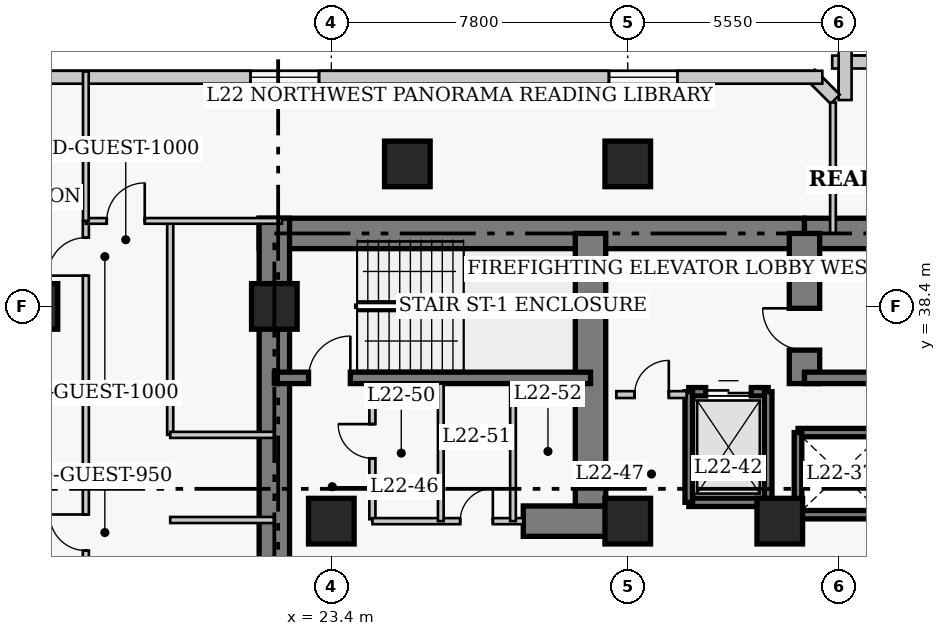
"""IFC4 building model, lengths in metres.
Left out: names, types, materials, properties, quantities, classifications, styles, units other than length and angle.
Written with IfcOpenShell. Run it as: python <this file> out.ifc"""

import sys

from ifc_helpers import new_model, si_unit, direction, frame, frame_2d, origin, origin_2d, place, context, subcontext, project, spatial, rectangle, extrude, element, fill, save


model = new_model("IFC4")
c1 = context("Model", 3, precision=1e-05, world=origin(), true_north=direction((0.0, 1.0)))
c2 = subcontext(c1, "Body", "Model", "MODEL_VIEW")
j1 = project(units=[si_unit("LENGTHUNIT", "METRE"), si_unit("PLANEANGLEUNIT", "RADIAN")], contexts=[c1])
p1 = place(None, origin())
s1 = spatial("IfcSite", under=j1, at=p1, CompositionType="ELEMENT")
p2 = place(p1, origin())
s2 = spatial("IfcBuilding", under=s1, at=p2, CompositionType="ELEMENT")
p3 = place(p2, frame((0.0, 0.0, 91.8)))
s3 = spatial("IfcBuildingStorey", under=s2, at=p3, CompositionType="ELEMENT", Elevation=91.8)
p4 = place(p3, frame((21.5, 40.32, 0.0), z_axis=(0.0, 0.0, 1.0), x_axis=(1.0, 0.0, 0.0)))
e1 = element("IfcWall", 1, at=p4, inside=s3, PredefinedType="SHEAR", context=c2, shape_type="SweptSolid", body=[
    extrude(rectangle(XDim=14.35, YDim=0.8, at=frame_2d((7.175, 0.0))), origin(), (0.0, 0.0, 1.0), 3.8),
])
p5 = place(p3, frame((35.85, 40.32, 0.0), z_axis=(0.0, 0.0, 1.0), x_axis=(1.0, 0.0, 0.0)))
e2 = element("IfcWall", 2, at=p5, inside=s3, PredefinedType="SHEAR", context=c2, shape_type="SweptSolid", body=[
    extrude(rectangle(XDim=12.6, YDim=0.8, at=frame_2d((6.3, 0.0))), origin(), (0.0, 0.0, 1.0), 3.8),
])
p6 = place(p3, frame((21.9, 27.05, 0.0), z_axis=(0.0, 0.0, 1.0), x_axis=(0.0, 1.0, 0.0)))
e3 = element("IfcWall", 3, at=p6, inside=s3, PredefinedType="SHEAR", context=c2, shape_type="SweptSolid", body=[
    extrude(rectangle(XDim=13.67, YDim=0.8, at=frame_2d((6.835, 0.0))), origin(), (0.0, 0.0, 1.0), 3.8),
])
p7 = place(p3, frame((28.45, 32.75, 0.0), z_axis=(0.0, 0.0, 1.0), x_axis=(1.0, 0.0, 0.0)))
e4 = element("IfcWall", 4, at=p7, inside=s3, PredefinedType="SHEAR", context=c2, shape_type="SweptSolid", body=[
    extrude(rectangle(XDim=2.4, YDim=0.8, at=frame_2d((1.2, 0.0))), origin(), (0.0, 0.0, 1.0), 3.8),
])
p8 = place(p3, frame((30.22, 33.15, 0.0), z_axis=(0.0, 0.0, 1.0), x_axis=(0.0, 1.0, 0.0)))
e5 = element("IfcWall", 5, at=p8, inside=s3, PredefinedType="SHEAR", context=c2, shape_type="SweptSolid", body=[
    extrude(rectangle(XDim=7.17, YDim=0.8, at=frame_2d((3.585, 0.0))), origin(), (0.0, 0.0, 1.0), 3.8),
])
p9 = place(p3, frame((35.85, 36.37, 0.0), z_axis=(0.0, 0.0, 1.0), x_axis=(0.0, 1.0, 0.0)))
e6 = element("IfcWall", 6, at=p9, inside=s3, PredefinedType="SHEAR", context=c2, shape_type="SweptSolid", body=[
    extrude(rectangle(XDim=3.95, YDim=0.8, at=frame_2d((1.975, 0.0))), origin(), (0.0, 0.0, 1.0), 3.8),
])
p10 = place(p9, frame((0.88, 0.0, 0.0)))
e7 = element("IfcOpeningElement", 7, at=p10, cuts=e6, PredefinedType="OPENING", context=c2, shape_type="SweptSolid", body=[
    extrude(rectangle(XDim=1.1, YDim=2.15, at=frame_2d((0.55, 1.075))), frame((0.0, 0.41, 0.0), z_axis=(0.0, -1.0, 0.0), x_axis=(1.0, 0.0, 0.0)), (0.0, 0.0, 1.0), 0.82),
])
p11 = place(p3, frame((21.9, 36.52, 0.0), z_axis=(0.0, 0.0, 1.0), x_axis=(1.0, 0.0, 0.0)))
e8 = element("IfcWall", 8, at=p11, inside=s3, PredefinedType="SHEAR", context=c2, shape_type="SweptSolid", body=[
    extrude(rectangle(XDim=8.32, YDim=0.3, at=frame_2d((4.16, 0.0))), origin(), (0.0, 0.0, 1.0), 3.8),
])
p12 = place(p11, frame((0.9, 0.0, 0.0)))
e9 = element("IfcOpeningElement", 9, at=p12, cuts=e8, PredefinedType="OPENING", context=c2, shape_type="SweptSolid", body=[
    extrude(rectangle(XDim=1.1, YDim=2.15, at=frame_2d((0.55, 1.075))), frame((0.0, 0.16, 0.0), z_axis=(0.0, -1.0, 0.0), x_axis=(1.0, 0.0, 0.0)), (0.0, 0.0, 1.0), 0.32),
])
p13 = place(p3, frame((35.85, 36.52, 0.0), z_axis=(0.0, 0.0, 1.0), x_axis=(1.0, 0.0, 0.0)))
e10 = element("IfcWall", 10, at=p13, inside=s3, PredefinedType="SHEAR", context=c2, shape_type="SweptSolid", body=[
    extrude(rectangle(XDim=8.33, YDim=0.3, at=frame_2d((4.165, 0.0))), origin(), (0.0, 0.0, 1.0), 3.8),
])
for number, where, z_axis, x_axis in (
    (11, (15.6, 38.4, 0.0), (0.0, 0.0, 1.0), (1.0, 0.0, 0.0)),
    (12, (21.9, 38.4, 0.0), (0.0, 0.0, 1.0), (1.0, 0.0, 0.0)),
    (13, (23.4, 32.75, 0.0), (0.0, 0.0, 1.0), (1.0, 0.0, 0.0)),
    (14, (31.2, 32.75, 0.0), (0.0, 0.0, 1.0), (1.0, 0.0, 0.0)),
    (15, (35.2, 32.75, 0.0), (0.0, 0.0, 1.0), (1.0, 0.0, 0.0)),
    (16, (25.4, 42.15, 0.0), (0.0, 0.0, 1.0), (1.0, 0.0, 0.0)),
    (17, (31.2, 42.15, 0.0), (0.0, 0.0, 1.0), (1.0, 0.0, 0.0)),
):
    element("IfcColumn", number, at=place(p3, frame(where, z_axis=z_axis, x_axis=x_axis)), inside=s3, PredefinedType="COLUMN", context=c2, shape_type="SweptSolid", body=[
        extrude(rectangle(XDim=1.2, YDim=1.2, at=origin_2d()), origin(), (0.0, 0.0, 1.0), 3.8),
    ])
p14 = place(p3, frame((41.42, 44.83, 0.0), z_axis=(0.0, 0.0, 1.0), x_axis=(-1.0, 0.0, 0.0)))
e18 = element("IfcWall", 18, at=p14, inside=s3, PredefinedType="SOLIDWALL", context=c2, shape_type="SweptSolid", body=[
    extrude(rectangle(XDim=4.84, YDim=0.34, at=frame_2d((2.42, 0.0))), origin(), (0.0, 0.0, 1.0), 3.54),
])
p15 = place(p14, frame((1.52, 0.0, 0.85)))
e19 = element("IfcOpeningElement", 19, at=p15, cuts=e18, PredefinedType="OPENING", context=c2, shape_type="SweptSolid", body=[
    extrude(rectangle(XDim=1.8, YDim=1.8, at=frame_2d((0.9, 0.9))), frame((0.0, 0.18, 0.0), z_axis=(0.0, -1.0, 0.0), x_axis=(1.0, 0.0, 0.0)), (0.0, 0.0, 1.0), 0.36),
])
p16 = place(p3, frame((36.92, 45.17, 0.0), z_axis=(0.0, 0.0, 1.0), x_axis=(0.0, -1.0, 0.0)))
e20 = element("IfcWall", 20, at=p16, inside=s3, PredefinedType="SOLIDWALL", context=c2, shape_type="SweptSolid", body=[
    extrude(rectangle(XDim=1.34, YDim=0.34, at=frame_2d((0.67, 0.0))), origin(), (0.0, 0.0, 1.0), 3.54),
])
p17 = place(p3, frame((36.658, 43.852, 0.0), z_axis=(0.0, 0.0, 1.0), x_axis=(-0.707238225886, 0.706975312048, 0.0)))
e21 = element("IfcWall", 21, at=p17, inside=s3, PredefinedType="SOLIDWALL", context=c2, shape_type="SweptSolid", body=[
    extrude(rectangle(XDim=0.929, YDim=0.34, at=frame_2d((0.464, 0.0))), origin(), (0.0, 0.0, 1.0), 3.54),
])
p18 = place(p3, frame((36.32, 44.43, 0.0), z_axis=(0.0, 0.0, 1.0), x_axis=(-1.0, 0.0, 0.0)))
e22 = element("IfcWall", 22, at=p18, inside=s3, PredefinedType="SOLIDWALL", context=c2, shape_type="SweptSolid", body=[
    extrude(rectangle(XDim=28.29, YDim=0.34, at=frame_2d((14.145, 0.0))), origin(), (0.0, 0.0, 1.0), 3.54),
])
p19 = place(p18, frame((3.815, 0.0, 0.85)))
e23 = element("IfcOpeningElement", 23, at=p19, cuts=e22, PredefinedType="OPENING", context=c2, shape_type="SweptSolid", body=[
    extrude(rectangle(XDim=1.8, YDim=1.8, at=frame_2d((0.9, 0.9))), frame((0.0, 0.18, 0.0), z_axis=(0.0, -1.0, 0.0), x_axis=(1.0, 0.0, 0.0)), (0.0, 0.0, 1.0), 0.36),
])
p20 = place(p18, frame((13.245, 0.0, 0.85)))
e24 = element("IfcOpeningElement", 24, at=p20, cuts=e22, PredefinedType="OPENING", context=c2, shape_type="SweptSolid", body=[
    extrude(rectangle(XDim=1.8, YDim=1.8, at=frame_2d((0.9, 0.9))), frame((0.0, 0.18, 0.0), z_axis=(0.0, -1.0, 0.0), x_axis=(1.0, 0.0, 0.0)), (0.0, 0.0, 1.0), 0.36),
])
p21 = place(p18, frame((22.675, 0.0, 0.85)))
e25 = element("IfcOpeningElement", 25, at=p21, cuts=e22, PredefinedType="OPENING", context=c2, shape_type="SweptSolid", body=[
    extrude(rectangle(XDim=1.8, YDim=1.8, at=frame_2d((0.9, 0.9))), frame((0.0, 0.18, 0.0), z_axis=(0.0, -1.0, 0.0), x_axis=(1.0, 0.0, 0.0)), (0.0, 0.0, 1.0), 0.36),
])
for number, where, z_axis, x_axis in (
    (26, (35.68, 35.08, 0.0), (0.0, 0.0, 1.0), (1.0, 0.0, 0.0)),
    (27, (35.68, 32.92, 0.0), (0.0, 0.0, 1.0), (1.0, 0.0, 0.0)),
):
    element("IfcWall", number, at=place(p3, frame(where, z_axis=z_axis, x_axis=x_axis)), inside=s3, PredefinedType="SHEAR", context=c2, shape_type="SweptSolid", body=[
        extrude(rectangle(XDim=2.32, YDim=0.22, at=frame_2d((1.16, 0.0))), origin(), (0.0, 0.0, 1.0), 3.8),
    ])
p22 = place(p3, frame((35.68, 32.92, 0.0), z_axis=(0.0, 0.0, 1.0), x_axis=(0.0, 1.0, 0.0)))
e28 = element("IfcWall", 28, at=p22, inside=s3, PredefinedType="SHEAR", context=c2, shape_type="SweptSolid", body=[
    extrude(rectangle(XDim=2.16, YDim=0.2, at=frame_2d((1.08, 0.0))), origin(), (0.0, 0.0, 1.0), 3.8),
])
p23 = place(p3, frame((32.805, 36.155, 0.0), z_axis=(0.0, 0.0, 1.0), x_axis=(1.0, 0.0, 0.0)))
e29 = element("IfcWall", 29, at=p23, inside=s3, PredefinedType="SHEAR", context=c2, shape_type="SweptSolid", body=[
    extrude(rectangle(XDim=2.09, YDim=0.22, at=frame_2d((1.045, 0.0))), origin(), (0.0, 0.0, 1.0), 3.8),
])
p24 = place(p23, frame((0.445, 0.0, 0.0)))
e30 = element("IfcOpeningElement", 30, at=p24, cuts=e29, PredefinedType="OPENING", context=c2, shape_type="SweptSolid", body=[
    extrude(rectangle(XDim=1.2, YDim=2.15, at=frame_2d((0.6, 1.075))), frame((0.0, 0.12, 0.0), z_axis=(0.0, -1.0, 0.0), x_axis=(1.0, 0.0, 0.0)), (0.0, 0.0, 1.0), 0.24),
])
p25 = place(p3, frame((32.805, 33.245, 0.0), z_axis=(0.0, 0.0, 1.0), x_axis=(1.0, 0.0, 0.0)))
e31 = element("IfcWall", 31, at=p25, inside=s3, PredefinedType="SHEAR", context=c2, shape_type="SweptSolid", body=[
    extrude(rectangle(XDim=2.09, YDim=0.22, at=frame_2d((1.045, 0.0))), origin(), (0.0, 0.0, 1.0), 3.8),
])
for number, where, z_axis, x_axis in (
    (32, (32.805, 33.245, 0.0), (0.0, 0.0, 1.0), (0.0, 1.0, 0.0)),
    (33, (34.895, 33.245, 0.0), (0.0, 0.0, 1.0), (0.0, 1.0, 0.0)),
):
    element("IfcWall", number, at=place(p3, frame(where, z_axis=z_axis, x_axis=x_axis)), inside=s3, PredefinedType="SHEAR", context=c2, shape_type="SweptSolid", body=[
        extrude(rectangle(XDim=2.91, YDim=0.2, at=frame_2d((1.455, 0.0))), origin(), (0.0, 0.0, 1.0), 3.8),
    ])
p26 = place(p3, frame((30.9, 36.08, 0.0), z_axis=(0.0, 0.0, 1.0), x_axis=(1.0, 0.0, 0.0)))
e34 = element("IfcWall", 34, at=p26, inside=s3, PredefinedType="PARTITIONING", context=c2, shape_type="SweptSolid", body=[
    extrude(rectangle(XDim=1.85, YDim=0.18, at=frame_2d((0.925, 0.0))), origin(), (0.0, 0.0, 1.0), 3.54),
])
p27 = place(p26, frame((0.48, 0.0, 0.0)))
e35 = element("IfcOpeningElement", 35, at=p27, cuts=e34, PredefinedType="OPENING", context=c2, shape_type="SweptSolid", body=[
    extrude(rectangle(XDim=0.9, YDim=2.15, at=frame_2d((0.45, 1.075))), frame((0.0, 0.1, 0.0), z_axis=(0.0, -1.0, 0.0), x_axis=(1.0, 0.0, 0.0)), (0.0, 0.0, 1.0), 0.2),
])
p28 = place(p3, frame((24.48, 32.8, 0.0), z_axis=(0.0, 0.0, 1.0), x_axis=(0.0, 1.0, 0.0)))
e36 = element("IfcWall", 36, at=p28, inside=s3, PredefinedType="PARTITIONING", context=c2, shape_type="SweptSolid", body=[
    extrude(rectangle(XDim=3.57, YDim=0.16, at=frame_2d((1.785, 0.0))), origin(), (0.0, 0.0, 1.0), 3.54),
])
p29 = place(p28, frame((1.604, 0.0, 0.0)))
e37 = element("IfcOpeningElement", 37, at=p29, cuts=e36, PredefinedType="OPENING", context=c2, shape_type="SweptSolid", body=[
    extrude(rectangle(XDim=0.9, YDim=2.1, at=frame_2d((0.45, 1.05))), frame((0.0, 0.09, 0.0), z_axis=(0.0, -1.0, 0.0), x_axis=(1.0, 0.0, 0.0)), (0.0, 0.0, 1.0), 0.18),
])
p30 = place(p3, frame((24.48, 32.75, 0.0), z_axis=(0.0, 0.0, 1.0), x_axis=(1.0, 0.0, 0.0)))
e38 = element("IfcWall", 38, at=p30, inside=s3, PredefinedType="PARTITIONING", context=c2, shape_type="SweptSolid", body=[
    extrude(rectangle(XDim=3.97, YDim=0.16, at=frame_2d((1.985, 0.0))), origin(), (0.0, 0.0, 1.0), 3.54),
])
p31 = place(p30, frame((2.31, 0.0, 0.0)))
e39 = element("IfcOpeningElement", 39, at=p31, cuts=e38, PredefinedType="OPENING", context=c2, shape_type="SweptSolid", body=[
    extrude(rectangle(XDim=0.86, YDim=2.05, at=frame_2d((0.43, 1.025))), frame((0.0, 0.09, 0.0), z_axis=(0.0, -1.0, 0.0), x_axis=(1.0, 0.0, 0.0)), (0.0, 0.0, 1.0), 0.18),
])
for number, where, z_axis, x_axis in (
    (40, (26.28, 32.75, 0.0), (0.0, 0.0, 1.0), (0.0, 1.0, 0.0)),
    (41, (28.18, 32.75, 0.0), (0.0, 0.0, 1.0), (0.0, 1.0, 0.0)),
):
    element("IfcWall", number, at=place(p3, frame(where, z_axis=z_axis, x_axis=x_axis)), inside=s3, PredefinedType="PARTITIONING", context=c2, shape_type="SweptSolid", body=[
        extrude(rectangle(XDim=3.62, YDim=0.15, at=frame_2d((1.81, 0.0))), origin(), (0.0, 0.0, 1.0), 3.54),
    ])
p32 = place(p3, frame((16.94, 6.65, 0.0), z_axis=(0.0, 0.0, 1.0), x_axis=(0.0, 1.0, 0.0)))
e42 = element("IfcWall", 42, at=p32, inside=s3, PredefinedType="PARTITIONING", context=c2, shape_type="SweptSolid", body=[
    extrude(rectangle(XDim=34.0, YDim=0.16, at=frame_2d((17.0, 0.0))), origin(), (0.0, 0.0, 1.0), 3.54),
])
p33 = place(p32, frame((1.8, 0.0, 0.0)))
e43 = element("IfcOpeningElement", 43, at=p33, cuts=e42, PredefinedType="OPENING", context=c2, shape_type="SweptSolid", body=[
    extrude(rectangle(XDim=0.95, YDim=2.1, at=frame_2d((0.475, 1.05))), frame((0.0, 0.09, 0.0), z_axis=(0.0, -1.0, 0.0), x_axis=(1.0, 0.0, 0.0)), (0.0, 0.0, 1.0), 0.18),
])
p34 = place(p32, frame((8.475, 0.0, 0.0)))
e44 = element("IfcOpeningElement", 44, at=p34, cuts=e42, PredefinedType="OPENING", context=c2, shape_type="SweptSolid", body=[
    extrude(rectangle(XDim=0.95, YDim=2.1, at=frame_2d((0.475, 1.05))), frame((0.0, 0.09, 0.0), z_axis=(0.0, -1.0, 0.0), x_axis=(1.0, 0.0, 0.0)), (0.0, 0.0, 1.0), 0.18),
])
p35 = place(p32, frame((17.275, 0.0, 0.0)))
e45 = element("IfcOpeningElement", 45, at=p35, cuts=e42, PredefinedType="OPENING", context=c2, shape_type="SweptSolid", body=[
    extrude(rectangle(XDim=0.95, YDim=2.1, at=frame_2d((0.475, 1.05))), frame((0.0, 0.09, 0.0), z_axis=(0.0, -1.0, 0.0), x_axis=(1.0, 0.0, 0.0)), (0.0, 0.0, 1.0), 0.18),
])
p36 = place(p32, frame((25.325, 0.0, 0.0)))
e46 = element("IfcOpeningElement", 46, at=p36, cuts=e42, PredefinedType="OPENING", context=c2, shape_type="SweptSolid", body=[
    extrude(rectangle(XDim=0.95, YDim=2.1, at=frame_2d((0.475, 1.05))), frame((0.0, 0.09, 0.0), z_axis=(0.0, -1.0, 0.0), x_axis=(1.0, 0.0, 0.0)), (0.0, 0.0, 1.0), 0.18),
])
p37 = place(p32, frame((32.56, 0.0, 0.0)))
e47 = element("IfcOpeningElement", 47, at=p37, cuts=e42, PredefinedType="OPENING", context=c2, shape_type="SweptSolid", body=[
    extrude(rectangle(XDim=1.0, YDim=2.15, at=frame_2d((0.5, 1.075))), frame((0.0, 0.09, 0.0), z_axis=(0.0, -1.0, 0.0), x_axis=(1.0, 0.0, 0.0)), (0.0, 0.0, 1.0), 0.18),
])
p38 = place(p3, frame((19.16, 35.02, 0.0), z_axis=(0.0, 0.0, 1.0), x_axis=(0.0, 1.0, 0.0)))
e48 = element("IfcWall", 48, at=p38, inside=s3, PredefinedType="PARTITIONING", context=c2, shape_type="SweptSolid", body=[
    extrude(rectangle(XDim=5.63, YDim=0.16, at=frame_2d((2.815, 0.0))), origin(), (0.0, 0.0, 1.0), 3.54),
])
for number, where, z_axis, x_axis in (
    (49, (19.16, 35.02, 0.0), (0.0, 0.0, 1.0), (1.0, 0.0, 0.0)),
    (50, (19.16, 32.78, 0.0), (0.0, 0.0, 1.0), (1.0, 0.0, 0.0)),
):
    element("IfcWall", number, at=place(p3, frame(where, z_axis=z_axis, x_axis=x_axis)), inside=s3, PredefinedType="PARTITIONING", context=c2, shape_type="SweptSolid", body=[
        extrude(rectangle(XDim=2.74, YDim=0.16, at=frame_2d((1.37, 0.0))), origin(), (0.0, 0.0, 1.0), 3.54),
    ])
p39 = place(p3, frame((16.94, 40.65, 0.0), z_axis=(0.0, 0.0, 1.0), x_axis=(1.0, 0.0, 0.0)))
e51 = element("IfcWall", 51, at=p39, inside=s3, PredefinedType="PARTITIONING", context=c2, shape_type="SweptSolid", body=[
    extrude(rectangle(XDim=5.16, YDim=0.15, at=frame_2d((2.58, 0.0))), origin(), (0.0, 0.0, 1.0), 3.54),
])
p40 = place(p39, frame((0.55, 0.0, 0.0)))
e52 = element("IfcOpeningElement", 52, at=p40, cuts=e51, PredefinedType="OPENING", context=c2, shape_type="SweptSolid", body=[
    extrude(rectangle(XDim=1.0, YDim=2.15, at=frame_2d((0.5, 1.075))), frame((0.0, 0.085, 0.0), z_axis=(0.0, -1.0, 0.0), x_axis=(1.0, 0.0, 0.0)), (0.0, 0.0, 1.0), 0.17),
])
p41 = place(p3, frame((16.94, 40.65, 0.0), z_axis=(0.0, 0.0, 1.0), x_axis=(0.0, 1.0, 0.0)))
e53 = element("IfcWall", 53, at=p41, inside=s3, PredefinedType="PARTITIONING", context=c2, shape_type="SweptSolid", body=[
    extrude(rectangle(XDim=3.93, YDim=0.15, at=frame_2d((1.965, 0.0))), origin(), (0.0, 0.0, 1.0), 3.54),
])
p42 = place(p3, frame((36.6, 40.32, 0.0), z_axis=(0.0, 0.0, 1.0), x_axis=(0.0, 1.0, 0.0)))
e54 = element("IfcWall", 54, at=p42, inside=s3, PredefinedType="PARTITIONING", context=c2, shape_type="SweptSolid", body=[
    extrude(rectangle(XDim=3.445, YDim=0.15, at=frame_2d((1.723, 0.0))), origin(), (0.0, 0.0, 1.0), 3.54),
])
p43 = place(p3, frame((14.45, 36.1, 0.0), z_axis=(0.0, 0.0, 1.0), x_axis=(1.0, 0.0, 0.0)))
e55 = element("IfcWall", 55, at=p43, inside=s3, PredefinedType="PARTITIONING", context=c2, shape_type="SweptSolid", body=[
    extrude(rectangle(XDim=2.49, YDim=0.15, at=frame_2d((1.245, 0.0))), origin(), (0.0, 0.0, 1.0), 3.54),
])
p44 = place(p19, origin())
e56 = element("IfcWindow", 56, at=p44, inside=s3, PartitioningType="SINGLE_PANEL", PredefinedType="WINDOW", context=c2, shape_type="SweptSolid", body=[
    extrude(rectangle(XDim=1.8, YDim=1.8, at=frame_2d((0.9, 0.9))), frame((0.0, 0.03, 0.0), z_axis=(0.0, -1.0, 0.0), x_axis=(1.0, 0.0, 0.0)), (0.0, 0.0, 1.0), 0.06),
])
fill(e23, e56)
p45 = place(p20, origin())
e57 = element("IfcWindow", 57, at=p45, inside=s3, PartitioningType="SINGLE_PANEL", PredefinedType="WINDOW", context=c2, shape_type="SweptSolid", body=[
    extrude(rectangle(XDim=1.8, YDim=1.8, at=frame_2d((0.9, 0.9))), frame((0.0, 0.03, 0.0), z_axis=(0.0, -1.0, 0.0), x_axis=(1.0, 0.0, 0.0)), (0.0, 0.0, 1.0), 0.06),
])
fill(e24, e57)
p46 = place(p24, origin())
e58 = element("IfcDoor", 58, at=p46, inside=s3, OperationType="DOUBLE_DOOR_SLIDING", PredefinedType="DOOR", context=c2, shape_type="SweptSolid", body=[
    extrude(rectangle(XDim=1.2, YDim=2.15, at=frame_2d((0.6, 1.075))), frame((0.0, 0.025, 0.0), z_axis=(0.0, -1.0, 0.0), x_axis=(1.0, 0.0, 0.0)), (0.0, 0.0, 1.0), 0.05),
])
fill(e30, e58)
p47 = place(p27, origin())
e59 = element("IfcDoor", 59, at=p47, inside=s3, OperationType="SINGLE_SWING_RIGHT", PredefinedType="DOOR", context=c2, shape_type="SweptSolid", body=[
    extrude(rectangle(XDim=0.9, YDim=2.15, at=frame_2d((0.45, 1.075))), frame((0.0, 0.025, 0.0), z_axis=(0.0, -1.0, 0.0), x_axis=(1.0, 0.0, 0.0)), (0.0, 0.0, 1.0), 0.05),
])
fill(e35, e59)
p48 = place(p29, origin())
e60 = element("IfcDoor", 60, at=p48, inside=s3, OperationType="SINGLE_SWING_RIGHT", PredefinedType="DOOR", context=c2, shape_type="SweptSolid", body=[
    extrude(rectangle(XDim=0.9, YDim=2.1, at=frame_2d((0.45, 1.05))), frame((0.0, 0.025, 0.0), z_axis=(0.0, -1.0, 0.0), x_axis=(1.0, 0.0, 0.0)), (0.0, 0.0, 1.0), 0.05),
])
fill(e37, e60)
p49 = place(p31, origin())
e61 = element("IfcDoor", 61, at=p49, inside=s3, OperationType="SINGLE_SWING_RIGHT", PredefinedType="DOOR", context=c2, shape_type="SweptSolid", body=[
    extrude(rectangle(XDim=0.86, YDim=2.05, at=frame_2d((0.43, 1.025))), frame((0.0, 0.025, 0.0), z_axis=(0.0, -1.0, 0.0), x_axis=(1.0, 0.0, 0.0)), (0.0, 0.0, 1.0), 0.05),
])
fill(e39, e61)
p50 = place(p40, origin())
e62 = element("IfcDoor", 62, at=p50, inside=s3, OperationType="SINGLE_SWING_RIGHT", PredefinedType="DOOR", context=c2, shape_type="SweptSolid", body=[
    extrude(rectangle(XDim=1.0, YDim=2.15, at=frame_2d((0.5, 1.075))), frame((0.0, 0.025, 0.0), z_axis=(0.0, -1.0, 0.0), x_axis=(1.0, 0.0, 0.0)), (0.0, 0.0, 1.0), 0.05),
])
fill(e52, e62)
p51 = place(p36, origin())
e63 = element("IfcDoor", 63, at=p51, inside=s3, OperationType="SINGLE_SWING_RIGHT", PredefinedType="DOOR", context=c2, shape_type="SweptSolid", body=[
    extrude(rectangle(XDim=0.95, YDim=2.1, at=frame_2d((0.475, 1.05))), frame((0.0, 0.025, 0.0), z_axis=(0.0, -1.0, 0.0), x_axis=(1.0, 0.0, 0.0)), (0.0, 0.0, 1.0), 0.05),
])
fill(e46, e63)
p52 = place(p37, origin())
e64 = element("IfcDoor", 64, at=p52, inside=s3, OperationType="SINGLE_SWING_LEFT", PredefinedType="DOOR", context=c2, shape_type="SweptSolid", body=[
    extrude(rectangle(XDim=1.0, YDim=2.15, at=frame_2d((0.5, 1.075))), frame((0.0, 0.025, 0.0), z_axis=(0.0, -1.0, 0.0), x_axis=(1.0, 0.0, 0.0)), (0.0, 0.0, 1.0), 0.05),
])
fill(e47, e64)
p53 = place(p12, origin())
e65 = element("IfcDoor", 65, at=p53, inside=s3, OperationType="SINGLE_SWING_RIGHT", PredefinedType="DOOR", context=c2, shape_type="SweptSolid", body=[
    extrude(rectangle(XDim=1.1, YDim=2.15, at=frame_2d((0.55, 1.075))), frame((0.0, 0.025, 0.0), z_axis=(0.0, -1.0, 0.0), x_axis=(1.0, 0.0, 0.0)), (0.0, 0.0, 1.0), 0.05),
])
fill(e9, e65)
p54 = place(p10, origin())
e66 = element("IfcDoor", 66, at=p54, inside=s3, OperationType="SINGLE_SWING_RIGHT", PredefinedType="DOOR", context=c2, shape_type="SweptSolid", body=[
    extrude(rectangle(XDim=1.1, YDim=2.15, at=frame_2d((0.55, 1.075))), frame((0.0, 0.025, 0.0), z_axis=(0.0, -1.0, 0.0), x_axis=(1.0, 0.0, 0.0)), (0.0, 0.0, 1.0), 0.05),
])
fill(e7, e66)
save(model, sys.argv[1])
